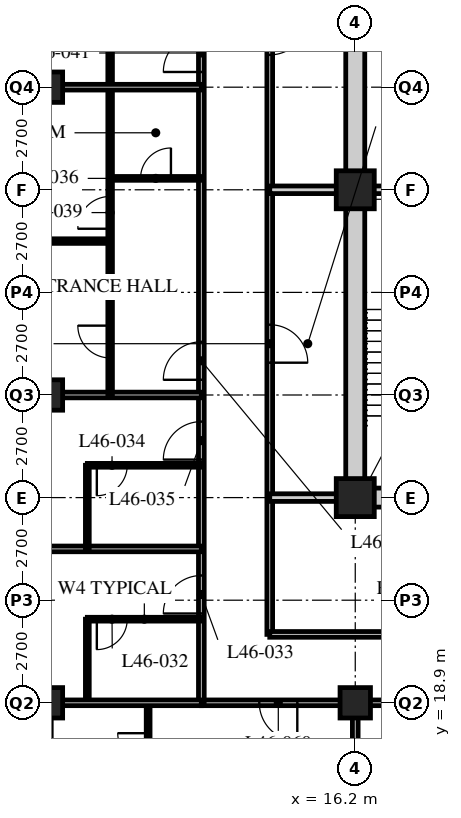
"""IFC4 building model, lengths in metres.
Left out: names, types, materials, properties, quantities, classifications, styles, units other than length and angle.
Written with IfcOpenShell. Run it as: python <this file> out.ifc"""

import sys

from ifc_helpers import new_model, si_unit, direction, frame, frame_2d, origin, origin_2d, place, context, subcontext, project, spatial, rectangle, hollow_rectangle, extrude, element, fill, save


model = new_model("IFC4")
c1 = context("Model", 3, precision=1e-05, world=origin(), true_north=direction((0.0, 1.0)))
c2 = subcontext(c1, "Body", "Model", "MODEL_VIEW")
j1 = project(units=[si_unit("LENGTHUNIT", "METRE"), si_unit("PLANEANGLEUNIT", "RADIAN")], contexts=[c1])
p1 = place(None, origin())
s1 = spatial("IfcSite", under=j1, at=p1, CompositionType="ELEMENT")
p2 = place(p1, origin())
s2 = spatial("IfcBuilding", under=s1, at=p2, CompositionType="ELEMENT")
p3 = place(p2, frame((0.0, 0.0, 181.2)))
s3 = spatial("IfcBuildingStorey", under=s2, at=p3, CompositionType="ELEMENT", Elevation=181.2)
for number, where, z_axis, x_axis in (
    (1, (8.1, 18.9, 0.0), (0.0, 0.0, 1.0), (1.0, 0.0, 0.0)),
    (2, (8.1, 27.0, 0.0), (0.0, 0.0, 1.0), (1.0, 0.0, 0.0)),
    (3, (8.1, 35.1, 0.0), (0.0, 0.0, 1.0), (1.0, 0.0, 0.0)),
    (4, (16.2, 18.9, 0.0), (0.0, 0.0, 1.0), (1.0, 0.0, 0.0)),
):
    element("IfcColumn", number, at=place(p3, frame(where, z_axis=z_axis, x_axis=x_axis)), inside=s3, PredefinedType="COLUMN", context=c2, shape_type="SweptSolid", body=[
        extrude(hollow_rectangle(XDim=0.8, YDim=0.8, WallThickness=0.08, at=origin_2d()), origin(), (0.0, 0.0, 1.0), 3.6),
    ])
for number, where, z_axis, x_axis in (
    (5, (16.2, 24.3, 0.0), (0.0, 0.0, 1.0), (1.0, 0.0, 0.0)),
    (6, (16.2, 32.4, 0.0), (0.0, 0.0, 1.0), (1.0, 0.0, 0.0)),
):
    element("IfcColumn", number, at=place(p3, frame(where, z_axis=z_axis, x_axis=x_axis)), inside=s3, PredefinedType="COLUMN", context=c2, shape_type="SweptSolid", body=[
        extrude(hollow_rectangle(XDim=1.0, YDim=1.0, WallThickness=0.1, at=origin_2d()), origin(), (0.0, 0.0, 1.0), 3.6),
    ])
p4 = place(p3, frame((12.15, 18.9, 0.0), z_axis=(0.0, 0.0, 1.0), x_axis=(1.0, 0.0, 0.0)))
e7 = element("IfcWall", 7, at=p4, inside=s3, PredefinedType="PARTITIONING", context=c2, shape_type="SweptSolid", body=[
    extrude(rectangle(XDim=32.4, YDim=0.15, at=frame_2d((16.2, 0.0))), origin(), (0.0, 0.0, 1.0), 2.778),
])
p5 = place(p4, frame((4.95, 0.0, 0.0)))
e8 = element("IfcOpeningElement", 8, at=p5, cuts=e7, PredefinedType="OPENING", context=c2, shape_type="SweptSolid", body=[
    extrude(rectangle(XDim=1.0, YDim=2.1, at=frame_2d((0.5, 1.05))), frame((0.0, 0.085, 0.0), z_axis=(0.0, -1.0, 0.0), x_axis=(1.0, 0.0, 0.0)), (0.0, 0.0, 1.0), 0.17),
])
p6 = place(p4, frame((13.05, 0.0, 0.0)))
e9 = element("IfcOpeningElement", 9, at=p6, cuts=e7, PredefinedType="OPENING", context=c2, shape_type="SweptSolid", body=[
    extrude(rectangle(XDim=1.0, YDim=2.1, at=frame_2d((0.5, 1.05))), frame((0.0, 0.085, 0.0), z_axis=(0.0, -1.0, 0.0), x_axis=(1.0, 0.0, 0.0)), (0.0, 0.0, 1.0), 0.17),
])
p7 = place(p4, frame((21.15, 0.0, 0.0)))
e10 = element("IfcOpeningElement", 10, at=p7, cuts=e7, PredefinedType="OPENING", context=c2, shape_type="SweptSolid", body=[
    extrude(rectangle(XDim=1.0, YDim=2.1, at=frame_2d((0.5, 1.05))), frame((0.0, 0.085, 0.0), z_axis=(0.0, -1.0, 0.0), x_axis=(1.0, 0.0, 0.0)), (0.0, 0.0, 1.0), 0.17),
])
p8 = place(p4, frame((1.525, 0.0, 0.0)))
e11 = element("IfcOpeningElement", 11, at=p8, cuts=e7, PredefinedType="OPENING", context=c2, shape_type="SweptSolid", body=[
    extrude(rectangle(XDim=1.0, YDim=2.1, at=frame_2d((0.5, 1.05))), frame((0.0, 0.085, 0.0), z_axis=(0.0, -1.0, 0.0), x_axis=(1.0, 0.0, 0.0)), (0.0, 0.0, 1.0), 0.17),
])
p9 = place(p4, frame((29.875, 0.0, 0.0)))
e12 = element("IfcOpeningElement", 12, at=p9, cuts=e7, PredefinedType="OPENING", context=c2, shape_type="SweptSolid", body=[
    extrude(rectangle(XDim=1.0, YDim=2.1, at=frame_2d((0.5, 1.05))), frame((0.0, 0.085, 0.0), z_axis=(0.0, -1.0, 0.0), x_axis=(1.0, 0.0, 0.0)), (0.0, 0.0, 1.0), 0.17),
])
p10 = place(p3, frame((12.15, 18.9, 0.0), z_axis=(0.0, 0.0, 1.0), x_axis=(0.0, 1.0, 0.0)))
e13 = element("IfcWall", 13, at=p10, inside=s3, PredefinedType="PARTITIONING", context=c2, shape_type="SweptSolid", body=[
    extrude(rectangle(XDim=28.35, YDim=0.15, at=frame_2d((14.175, 0.0))), origin(), (0.0, 0.0, 1.0), 3.39),
])
p11 = place(p10, frame((2.35, 0.0, 0.0)))
e14 = element("IfcOpeningElement", 14, at=p11, cuts=e13, PredefinedType="OPENING", context=c2, shape_type="SweptSolid", body=[
    extrude(rectangle(XDim=1.0, YDim=2.1, at=frame_2d((0.5, 1.05))), frame((0.0, 0.085, 0.0), z_axis=(0.0, -1.0, 0.0), x_axis=(1.0, 0.0, 0.0)), (0.0, 0.0, 1.0), 0.17),
])
p12 = place(p10, frame((6.4, 0.0, 0.0)))
e15 = element("IfcOpeningElement", 15, at=p12, cuts=e13, PredefinedType="OPENING", context=c2, shape_type="SweptSolid", body=[
    extrude(rectangle(XDim=1.0, YDim=2.1, at=frame_2d((0.5, 1.05))), frame((0.0, 0.085, 0.0), z_axis=(0.0, -1.0, 0.0), x_axis=(1.0, 0.0, 0.0)), (0.0, 0.0, 1.0), 0.17),
])
p13 = place(p10, frame((8.5, 0.0, 0.0)))
e16 = element("IfcOpeningElement", 16, at=p13, cuts=e13, PredefinedType="OPENING", context=c2, shape_type="SweptSolid", body=[
    extrude(rectangle(XDim=1.0, YDim=2.1, at=frame_2d((0.5, 1.05))), frame((0.0, 0.085, 0.0), z_axis=(0.0, -1.0, 0.0), x_axis=(1.0, 0.0, 0.0)), (0.0, 0.0, 1.0), 0.17),
])
p14 = place(p10, frame((16.6, 0.0, 0.0)))
e17 = element("IfcOpeningElement", 17, at=p14, cuts=e13, PredefinedType="OPENING", context=c2, shape_type="SweptSolid", body=[
    extrude(rectangle(XDim=1.0, YDim=2.1, at=frame_2d((0.5, 1.05))), frame((0.0, 0.085, 0.0), z_axis=(0.0, -1.0, 0.0), x_axis=(1.0, 0.0, 0.0)), (0.0, 0.0, 1.0), 0.17),
])
p15 = place(p10, frame((26.65, 0.0, 0.0)))
e18 = element("IfcOpeningElement", 18, at=p15, cuts=e13, PredefinedType="OPENING", context=c2, shape_type="SweptSolid", body=[
    extrude(rectangle(XDim=1.0, YDim=2.1, at=frame_2d((0.5, 1.05))), frame((0.0, 0.085, 0.0), z_axis=(0.0, -1.0, 0.0), x_axis=(1.0, 0.0, 0.0)), (0.0, 0.0, 1.0), 0.17),
])
p16 = place(p3, frame((13.95, 45.45, 0.0), z_axis=(0.0, 0.0, 1.0), x_axis=(0.0, -1.0, 0.0)))
e19 = element("IfcWall", 19, at=p16, inside=s3, PredefinedType="PARTITIONING", context=c2, shape_type="SweptSolid", body=[
    extrude(rectangle(XDim=24.75, YDim=0.15, at=frame_2d((12.375, 0.0))), origin(), (0.0, 0.0, 1.0), 3.39),
])
p17 = place(p16, frame((16.6, 0.0, 0.0)))
e20 = element("IfcOpeningElement", 20, at=p17, cuts=e19, PredefinedType="OPENING", context=c2, shape_type="SweptSolid", body=[
    extrude(rectangle(XDim=1.0, YDim=2.1, at=frame_2d((0.5, 1.05))), frame((0.0, 0.085, 0.0), z_axis=(0.0, -1.0, 0.0), x_axis=(1.0, 0.0, 0.0)), (0.0, 0.0, 1.0), 0.17),
])
p18 = place(p16, frame((8.5, 0.0, 0.0)))
e21 = element("IfcOpeningElement", 21, at=p18, cuts=e19, PredefinedType="OPENING", context=c2, shape_type="SweptSolid", body=[
    extrude(rectangle(XDim=1.0, YDim=2.1, at=frame_2d((0.5, 1.05))), frame((0.0, 0.085, 0.0), z_axis=(0.0, -1.0, 0.0), x_axis=(1.0, 0.0, 0.0)), (0.0, 0.0, 1.0), 0.17),
])
p19 = place(p3, frame((13.95, 20.7, 0.0), z_axis=(0.0, 0.0, 1.0), x_axis=(1.0, 0.0, 0.0)))
e22 = element("IfcWall", 22, at=p19, inside=s3, PredefinedType="PARTITIONING", context=c2, shape_type="SweptSolid", body=[
    extrude(rectangle(XDim=13.19, YDim=0.15, at=frame_2d((6.595, 0.0))), origin(), (0.0, 0.0, 1.0), 3.39),
])
p20 = place(p19, frame((6.1, 0.0, 0.0)))
e23 = element("IfcOpeningElement", 23, at=p20, cuts=e22, PredefinedType="OPENING", context=c2, shape_type="SweptSolid", body=[
    extrude(rectangle(XDim=1.0, YDim=2.1, at=frame_2d((0.5, 1.05))), frame((0.0, 0.085, 0.0), z_axis=(0.0, -1.0, 0.0), x_axis=(1.0, 0.0, 0.0)), (0.0, 0.0, 1.0), 0.17),
])
for number, where, z_axis, x_axis in (
    (24, (13.95, 32.4, 0.0), (0.0, 0.0, 1.0), (1.0, 0.0, 0.0)),
    (25, (13.95, 24.3, 0.0), (0.0, 0.0, 1.0), (1.0, 0.0, 0.0)),
):
    element("IfcWall", number, at=place(p3, frame(where, z_axis=z_axis, x_axis=x_axis)), inside=s3, PredefinedType="SOLIDWALL", context=c2, shape_type="SweptSolid", body=[
        extrude(rectangle(XDim=2.25, YDim=0.2, at=frame_2d((1.125, 0.0))), origin(), (0.0, 0.0, 1.0), 3.39),
    ])
p21 = place(p3, frame((9.15, 18.9, 0.0), z_axis=(0.0, 0.0, 1.0), x_axis=(0.0, 1.0, 0.0)))
e26 = element("IfcWall", 26, at=p21, inside=s3, PredefinedType="PARTITIONING", context=c2, shape_type="SweptSolid", body=[
    extrude(rectangle(XDim=2.2, YDim=0.1, at=frame_2d((1.1, 0.0))), origin(), (0.0, 0.0, 1.0), 3.39),
])
p22 = place(p3, frame((12.15, 21.1, 0.0), z_axis=(0.0, 0.0, 1.0), x_axis=(-1.0, 0.0, 0.0)))
e27 = element("IfcWall", 27, at=p22, inside=s3, PredefinedType="PARTITIONING", context=c2, shape_type="SweptSolid", body=[
    extrude(rectangle(XDim=3.0, YDim=0.1, at=frame_2d((1.5, 0.0))), origin(), (0.0, 0.0, 1.0), 3.39),
])
p23 = place(p22, frame((1.95, 0.0, 0.0)))
e28 = element("IfcOpeningElement", 28, at=p23, cuts=e27, PredefinedType="OPENING", context=c2, shape_type="SweptSolid", body=[
    extrude(rectangle(XDim=0.8, YDim=2.1, at=frame_2d((0.4, 1.05))), frame((0.0, 0.06, 0.0), z_axis=(0.0, -1.0, 0.0), x_axis=(1.0, 0.0, 0.0)), (0.0, 0.0, 1.0), 0.12),
])
p24 = place(p3, frame((12.15, 22.95, 0.0), z_axis=(0.0, 0.0, 1.0), x_axis=(-1.0, 0.0, 0.0)))
e29 = element("IfcWall", 29, at=p24, inside=s3, PredefinedType="PARTITIONING", context=c2, shape_type="SweptSolid", body=[
    extrude(rectangle(XDim=11.85, YDim=0.15, at=frame_2d((5.925, 0.0))), origin(), (0.0, 0.0, 1.0), 3.39),
])
p25 = place(p3, frame((9.15, 22.95, 0.0), z_axis=(0.0, 0.0, 1.0), x_axis=(0.0, 1.0, 0.0)))
e30 = element("IfcWall", 30, at=p25, inside=s3, PredefinedType="PARTITIONING", context=c2, shape_type="SweptSolid", body=[
    extrude(rectangle(XDim=2.2, YDim=0.1, at=frame_2d((1.1, 0.0))), origin(), (0.0, 0.0, 1.0), 3.39),
])
p26 = place(p3, frame((12.15, 25.15, 0.0), z_axis=(0.0, 0.0, 1.0), x_axis=(-1.0, 0.0, 0.0)))
e31 = element("IfcWall", 31, at=p26, inside=s3, PredefinedType="PARTITIONING", context=c2, shape_type="SweptSolid", body=[
    extrude(rectangle(XDim=3.0, YDim=0.1, at=frame_2d((1.5, 0.0))), origin(), (0.0, 0.0, 1.0), 3.39),
])
p27 = place(p26, frame((1.95, 0.0, 0.0)))
e32 = element("IfcOpeningElement", 32, at=p27, cuts=e31, PredefinedType="OPENING", context=c2, shape_type="SweptSolid", body=[
    extrude(rectangle(XDim=0.8, YDim=2.1, at=frame_2d((0.4, 1.05))), frame((0.0, 0.06, 0.0), z_axis=(0.0, -1.0, 0.0), x_axis=(1.0, 0.0, 0.0)), (0.0, 0.0, 1.0), 0.12),
])
p28 = place(p3, frame((12.15, 27.0, 0.0), z_axis=(0.0, 0.0, 1.0), x_axis=(-1.0, 0.0, 0.0)))
e33 = element("IfcWall", 33, at=p28, inside=s3, PredefinedType="PARTITIONING", context=c2, shape_type="SweptSolid", body=[
    extrude(rectangle(XDim=11.85, YDim=0.15, at=frame_2d((5.925, 0.0))), origin(), (0.0, 0.0, 1.0), 2.778),
])
p29 = place(p3, frame((9.75, 27.0, 0.0), z_axis=(0.0, 0.0, 1.0), x_axis=(0.0, 1.0, 0.0)))
e34 = element("IfcWall", 34, at=p29, inside=s3, PredefinedType="PARTITIONING", context=c2, shape_type="SweptSolid", body=[
    extrude(rectangle(XDim=16.2, YDim=0.12, at=frame_2d((8.1, 0.0))), origin(), (0.0, 0.0, 1.0), 3.39),
])
p30 = place(p29, frame((0.975, 0.0, 0.0)))
e35 = element("IfcOpeningElement", 35, at=p30, cuts=e34, PredefinedType="OPENING", context=c2, shape_type="SweptSolid", body=[
    extrude(rectangle(XDim=0.85, YDim=2.1, at=frame_2d((0.425, 1.05))), frame((0.0, 0.07, 0.0), z_axis=(0.0, -1.0, 0.0), x_axis=(1.0, 0.0, 0.0)), (0.0, 0.0, 1.0), 0.14),
])
p31 = place(p29, frame((4.375, 0.0, 0.0)))
e36 = element("IfcOpeningElement", 36, at=p31, cuts=e34, PredefinedType="OPENING", context=c2, shape_type="SweptSolid", body=[
    extrude(rectangle(XDim=0.85, YDim=2.1, at=frame_2d((0.425, 1.05))), frame((0.0, 0.07, 0.0), z_axis=(0.0, -1.0, 0.0), x_axis=(1.0, 0.0, 0.0)), (0.0, 0.0, 1.0), 0.14),
])
p32 = place(p29, frame((9.075, 0.0, 0.0)))
e37 = element("IfcOpeningElement", 37, at=p32, cuts=e34, PredefinedType="OPENING", context=c2, shape_type="SweptSolid", body=[
    extrude(rectangle(XDim=0.85, YDim=2.1, at=frame_2d((0.425, 1.05))), frame((0.0, 0.07, 0.0), z_axis=(0.0, -1.0, 0.0), x_axis=(1.0, 0.0, 0.0)), (0.0, 0.0, 1.0), 0.14),
])
p33 = place(p29, frame((12.475, 0.0, 0.0)))
e38 = element("IfcOpeningElement", 38, at=p33, cuts=e34, PredefinedType="OPENING", context=c2, shape_type="SweptSolid", body=[
    extrude(rectangle(XDim=0.85, YDim=2.1, at=frame_2d((0.425, 1.05))), frame((0.0, 0.07, 0.0), z_axis=(0.0, -1.0, 0.0), x_axis=(1.0, 0.0, 0.0)), (0.0, 0.0, 1.0), 0.14),
])
p34 = place(p3, frame((12.15, 32.7, 0.0), z_axis=(0.0, 0.0, 1.0), x_axis=(-1.0, 0.0, 0.0)))
e39 = element("IfcWall", 39, at=p34, inside=s3, PredefinedType="PARTITIONING", context=c2, shape_type="SweptSolid", body=[
    extrude(rectangle(XDim=2.4, YDim=0.1, at=frame_2d((1.2, 0.0))), origin(), (0.0, 0.0, 1.0), 3.39),
])
p35 = place(p34, frame((0.8, 0.0, 0.0)))
e40 = element("IfcOpeningElement", 40, at=p35, cuts=e39, PredefinedType="OPENING", context=c2, shape_type="SweptSolid", body=[
    extrude(rectangle(XDim=0.8, YDim=2.1, at=frame_2d((0.4, 1.05))), frame((0.0, 0.06, 0.0), z_axis=(0.0, -1.0, 0.0), x_axis=(1.0, 0.0, 0.0)), (0.0, 0.0, 1.0), 0.12),
])
p36 = place(p3, frame((9.75, 31.05, 0.0), z_axis=(0.0, 0.0, 1.0), x_axis=(-1.0, 0.0, 0.0)))
e41 = element("IfcWall", 41, at=p36, inside=s3, PredefinedType="PARTITIONING", context=c2, shape_type="SweptSolid", body=[
    extrude(rectangle(XDim=9.45, YDim=0.12, at=frame_2d((4.725, 0.0))), origin(), (0.0, 0.0, 1.0), 3.39),
])
p37 = place(p3, frame((12.15, 35.1, 0.0), z_axis=(0.0, 0.0, 1.0), x_axis=(-1.0, 0.0, 0.0)))
e42 = element("IfcWall", 42, at=p37, inside=s3, PredefinedType="PARTITIONING", context=c2, shape_type="SweptSolid", body=[
    extrude(rectangle(XDim=11.85, YDim=0.15, at=frame_2d((5.925, 0.0))), origin(), (0.0, 0.0, 1.0), 2.778),
])
p38 = place(p3, frame((10.75, 18.9, 0.0), z_axis=(0.0, 0.0, 1.0), x_axis=(0.0, -1.0, 0.0)))
e43 = element("IfcWall", 43, at=p38, inside=s3, PredefinedType="PARTITIONING", context=c2, shape_type="SweptSolid", body=[
    extrude(rectangle(XDim=2.4, YDim=0.1, at=frame_2d((1.2, 0.0))), origin(), (0.0, 0.0, 1.0), 3.39),
])
p39 = place(p38, frame((0.8, 0.0, 0.0)))
e44 = element("IfcOpeningElement", 44, at=p39, cuts=e43, PredefinedType="OPENING", context=c2, shape_type="SweptSolid", body=[
    extrude(rectangle(XDim=0.8, YDim=2.1, at=frame_2d((0.4, 1.05))), frame((0.0, 0.06, 0.0), z_axis=(0.0, -1.0, 0.0), x_axis=(1.0, 0.0, 0.0)), (0.0, 0.0, 1.0), 0.12),
])
for number, where, z_axis, x_axis in (
    (45, (4.35, 18.9, 0.0), (0.0, 0.0, 1.0), (1.0, 0.0, 0.0)),
    (46, (16.2, 18.9, 0.0), (0.0, 0.0, 1.0), (0.0, -1.0, 0.0)),
):
    element("IfcWall", number, at=place(p3, frame(where, z_axis=z_axis, x_axis=x_axis)), inside=s3, PredefinedType="PARTITIONING", context=c2, shape_type="SweptSolid", body=[
        extrude(rectangle(XDim=7.8, YDim=0.15, at=frame_2d((3.9, 0.0))), origin(), (0.0, 0.0, 1.0), 2.778),
    ])
p40 = place(p3, frame((15.95, 24.3, 0.0), z_axis=(0.0, 0.0, 1.0), x_axis=(1.0, 0.0, 0.0)))
e47 = element("IfcWall", 47, at=p40, inside=s3, PredefinedType="SOLIDWALL", context=c2, shape_type="SweptSolid", body=[
    extrude(rectangle(XDim=24.8, YDim=0.5, at=frame_2d((12.4, 0.0))), origin(), (0.0, 0.0, 1.0), 2.74),
])
p41 = place(p40, frame((11.5, 0.0, 0.0)))
e48 = element("IfcOpeningElement", 48, at=p41, cuts=e47, PredefinedType="OPENING", context=c2, shape_type="SweptSolid", body=[
    extrude(rectangle(XDim=1.8, YDim=2.4, at=frame_2d((0.9, 1.2))), frame((0.0, 0.26, 0.0), z_axis=(0.0, -1.0, 0.0), x_axis=(1.0, 0.0, 0.0)), (0.0, 0.0, 1.0), 0.52),
])
p42 = place(p3, frame((16.2, 24.55, 0.0), z_axis=(0.0, 0.0, 1.0), x_axis=(0.0, 1.0, 0.0)))
e49 = element("IfcWall", 49, at=p42, inside=s3, PredefinedType="SOLIDWALL", context=c2, shape_type="SweptSolid", body=[
    extrude(rectangle(XDim=15.7, YDim=0.5, at=frame_2d((7.85, 0.0))), origin(), (0.0, 0.0, 1.0), 2.778),
])
p43 = place(p3, frame((16.45, 32.4, 0.0), z_axis=(0.0, 0.0, 1.0), x_axis=(1.0, 0.0, 0.0)))
e50 = element("IfcWall", 50, at=p43, inside=s3, PredefinedType="SOLIDWALL", context=c2, shape_type="SweptSolid", body=[
    extrude(rectangle(XDim=7.95, YDim=0.2, at=frame_2d((3.975, 0.0))), origin(), (0.0, 0.0, 1.0), 2.778),
])
p44 = place(p17, origin())
e51 = element("IfcDoor", 51, at=p44, inside=s3, OperationType="SINGLE_SWING_RIGHT", PredefinedType="DOOR", context=c2, shape_type="SweptSolid", body=[
    extrude(rectangle(XDim=1.0, YDim=2.1, at=frame_2d((0.5, 1.05))), frame((0.0, 0.025, 0.0), z_axis=(0.0, -1.0, 0.0), x_axis=(1.0, 0.0, 0.0)), (0.0, 0.0, 1.0), 0.05),
])
fill(e20, e51)
p45 = place(p18, origin())
e52 = element("IfcDoor", 52, at=p45, inside=s3, OperationType="SINGLE_SWING_LEFT", PredefinedType="DOOR", context=c2, shape_type="SweptSolid", body=[
    extrude(rectangle(XDim=1.0, YDim=2.1, at=frame_2d((0.5, 1.05))), frame((0.0, 0.025, 0.0), z_axis=(0.0, -1.0, 0.0), x_axis=(1.0, 0.0, 0.0)), (0.0, 0.0, 1.0), 0.05),
])
fill(e21, e52)
p46 = place(p23, origin())
e53 = element("IfcDoor", 53, at=p46, inside=s3, OperationType="SINGLE_SWING_RIGHT", PredefinedType="DOOR", context=c2, shape_type="SweptSolid", body=[
    extrude(rectangle(XDim=0.8, YDim=2.1, at=frame_2d((0.4, 1.05))), frame((0.0, 0.025, 0.0), z_axis=(0.0, -1.0, 0.0), x_axis=(1.0, 0.0, 0.0)), (0.0, 0.0, 1.0), 0.05),
])
fill(e28, e53)
p47 = place(p11, origin())
e54 = element("IfcDoor", 54, at=p47, inside=s3, OperationType="SINGLE_SWING_LEFT", PredefinedType="DOOR", context=c2, shape_type="SweptSolid", body=[
    extrude(rectangle(XDim=1.0, YDim=2.1, at=frame_2d((0.5, 1.05))), frame((0.0, 0.025, 0.0), z_axis=(0.0, -1.0, 0.0), x_axis=(1.0, 0.0, 0.0)), (0.0, 0.0, 1.0), 0.05),
])
fill(e14, e54)
p48 = place(p27, origin())
e55 = element("IfcDoor", 55, at=p48, inside=s3, OperationType="SINGLE_SWING_RIGHT", PredefinedType="DOOR", context=c2, shape_type="SweptSolid", body=[
    extrude(rectangle(XDim=0.8, YDim=2.1, at=frame_2d((0.4, 1.05))), frame((0.0, 0.025, 0.0), z_axis=(0.0, -1.0, 0.0), x_axis=(1.0, 0.0, 0.0)), (0.0, 0.0, 1.0), 0.05),
])
fill(e32, e55)
p49 = place(p12, origin())
e56 = element("IfcDoor", 56, at=p49, inside=s3, OperationType="SINGLE_SWING_LEFT", PredefinedType="DOOR", context=c2, shape_type="SweptSolid", body=[
    extrude(rectangle(XDim=1.0, YDim=2.1, at=frame_2d((0.5, 1.05))), frame((0.0, 0.025, 0.0), z_axis=(0.0, -1.0, 0.0), x_axis=(1.0, 0.0, 0.0)), (0.0, 0.0, 1.0), 0.05),
])
fill(e15, e56)
p50 = place(p35, origin())
e57 = element("IfcDoor", 57, at=p50, inside=s3, OperationType="SINGLE_SWING_RIGHT", PredefinedType="DOOR", context=c2, shape_type="SweptSolid", body=[
    extrude(rectangle(XDim=0.8, YDim=2.1, at=frame_2d((0.4, 1.05))), frame((0.0, 0.025, 0.0), z_axis=(0.0, -1.0, 0.0), x_axis=(1.0, 0.0, 0.0)), (0.0, 0.0, 1.0), 0.05),
])
fill(e40, e57)
p51 = place(p13, origin())
e58 = element("IfcDoor", 58, at=p51, inside=s3, OperationType="SINGLE_SWING_LEFT", PredefinedType="DOOR", context=c2, shape_type="SweptSolid", body=[
    extrude(rectangle(XDim=1.0, YDim=2.1, at=frame_2d((0.5, 1.05))), frame((0.0, 0.025, 0.0), z_axis=(0.0, -1.0, 0.0), x_axis=(1.0, 0.0, 0.0)), (0.0, 0.0, 1.0), 0.05),
])
fill(e16, e58)
p52 = place(p30, origin())
e59 = element("IfcDoor", 59, at=p52, inside=s3, OperationType="SINGLE_SWING_RIGHT", PredefinedType="DOOR", context=c2, shape_type="SweptSolid", body=[
    extrude(rectangle(XDim=0.85, YDim=2.1, at=frame_2d((0.425, 1.05))), frame((0.0, 0.025, 0.0), z_axis=(0.0, -1.0, 0.0), x_axis=(1.0, 0.0, 0.0)), (0.0, 0.0, 1.0), 0.05),
])
fill(e35, e59)
p53 = place(p31, origin())
e60 = element("IfcDoor", 60, at=p53, inside=s3, OperationType="SINGLE_SWING_LEFT", PredefinedType="DOOR", context=c2, shape_type="SweptSolid", body=[
    extrude(rectangle(XDim=0.85, YDim=2.1, at=frame_2d((0.425, 1.05))), frame((0.0, 0.025, 0.0), z_axis=(0.0, -1.0, 0.0), x_axis=(1.0, 0.0, 0.0)), (0.0, 0.0, 1.0), 0.05),
])
fill(e36, e60)
p54 = place(p14, origin())
e61 = element("IfcDoor", 61, at=p54, inside=s3, OperationType="SINGLE_SWING_LEFT", PredefinedType="DOOR", context=c2, shape_type="SweptSolid", body=[
    extrude(rectangle(XDim=1.0, YDim=2.1, at=frame_2d((0.5, 1.05))), frame((0.0, 0.025, 0.0), z_axis=(0.0, -1.0, 0.0), x_axis=(1.0, 0.0, 0.0)), (0.0, 0.0, 1.0), 0.05),
])
fill(e17, e61)
p55 = place(p8, origin())
e62 = element("IfcDoor", 62, at=p55, inside=s3, OperationType="SINGLE_SWING_LEFT", PredefinedType="DOOR", context=c2, shape_type="SweptSolid", body=[
    extrude(rectangle(XDim=1.0, YDim=2.1, at=frame_2d((0.5, 1.05))), frame((0.0, 0.025, 0.0), z_axis=(0.0, -1.0, 0.0), x_axis=(1.0, 0.0, 0.0)), (0.0, 0.0, 1.0), 0.05),
])
fill(e11, e62)
p56 = place(p39, origin())
e63 = element("IfcDoor", 63, at=p56, inside=s3, OperationType="SINGLE_SWING_RIGHT", PredefinedType="DOOR", context=c2, shape_type="SweptSolid", body=[
    extrude(rectangle(XDim=0.8, YDim=2.1, at=frame_2d((0.4, 1.05))), frame((0.0, 0.025, 0.0), z_axis=(0.0, -1.0, 0.0), x_axis=(1.0, 0.0, 0.0)), (0.0, 0.0, 1.0), 0.05),
])
fill(e44, e63)
save(model, sys.argv[1])
